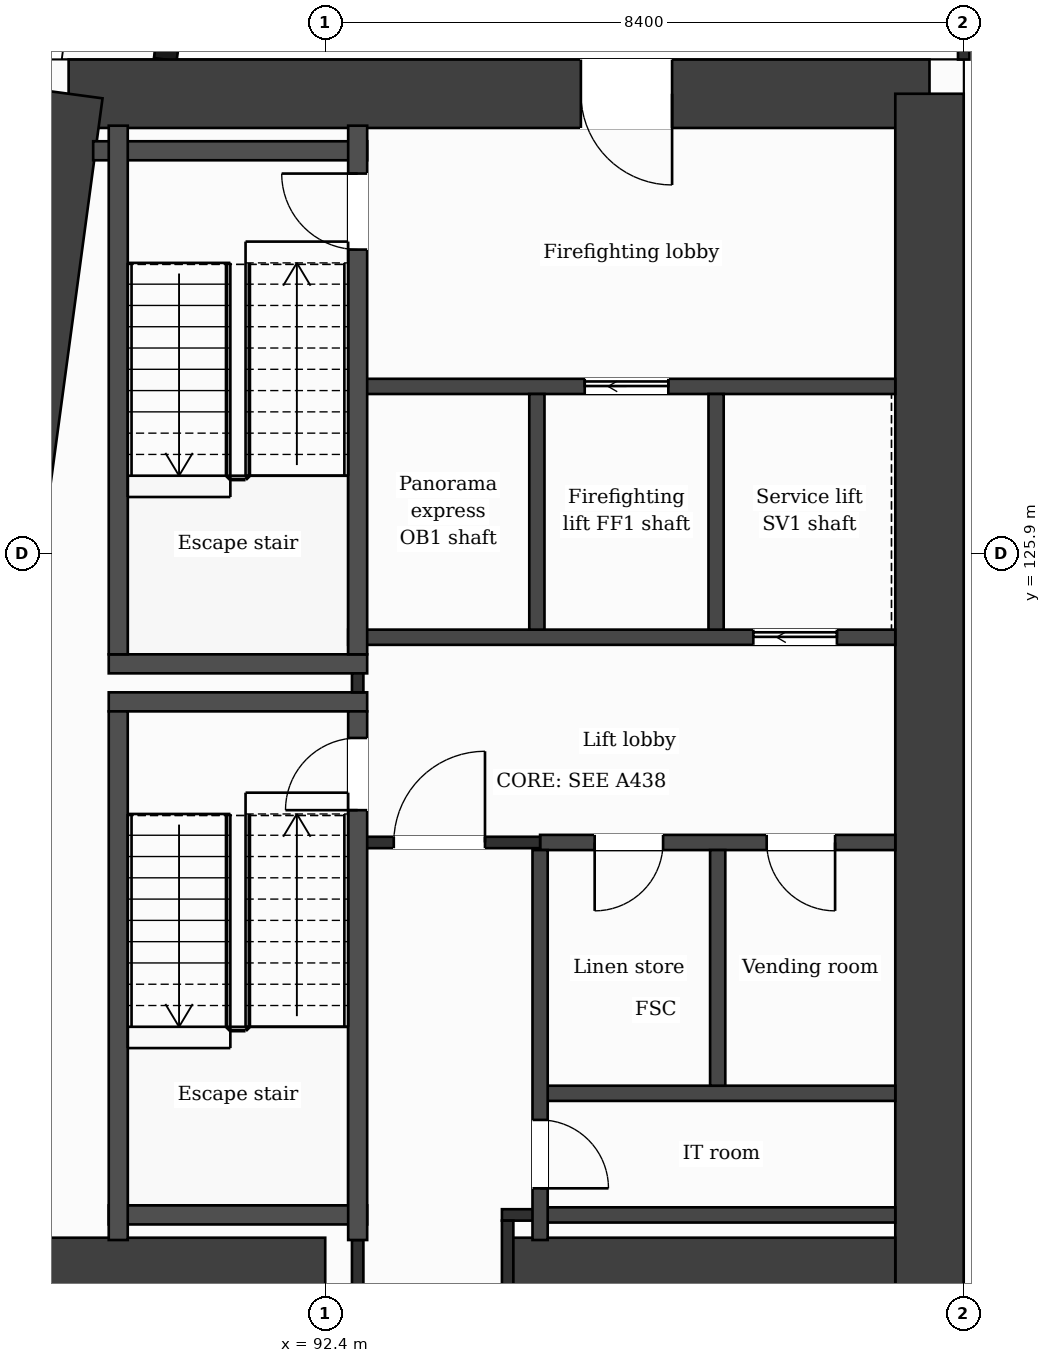
"""IFC4 building model, lengths in metres.
Left out: names, types, materials, properties, quantities, classifications, styles, units other than length and angle.
Written with IfcOpenShell. Run it as: python <this file> out.ifc"""

import sys

from ifc_helpers import new_model, si_unit, direction, frame, frame_2d, origin, place, context, subcontext, project, spatial, rectangle, extrude, element, fill, save


model = new_model("IFC4")
c1 = context("Model", 3, precision=1e-05, world=origin(), true_north=direction((0.0, 1.0)))
c2 = subcontext(c1, "Body", "Model", "MODEL_VIEW")
j1 = project(units=[si_unit("LENGTHUNIT", "METRE"), si_unit("PLANEANGLEUNIT", "RADIAN")], contexts=[c1])
p1 = place(None, origin())
s1 = spatial("IfcSite", under=j1, at=p1, CompositionType="ELEMENT")
p2 = place(p1, origin())
s2 = spatial("IfcBuilding", under=s1, at=p2, CompositionType="ELEMENT")
p3 = place(p2, frame((0.0, 0.0, 158.9)))
s3 = spatial("IfcBuildingStorey", under=s2, at=p3, CompositionType="ELEMENT", Elevation=158.9)
p4 = place(p3, frame((89.024, 131.95, 0.0), z_axis=(0.0, 0.0, 1.0), x_axis=(1.0, 0.0, 0.0)))
e1 = element("IfcWall", 1, at=p4, inside=s3, PredefinedType="SHEAR", context=c2, shape_type="SweptSolid", body=[
    extrude(rectangle(XDim=11.326, YDim=0.9, at=frame_2d((5.663, 0.0))), origin(), (0.0, 0.0, 1.0), 3.7),
])
p5 = place(p4, frame((6.739, 0.0, 0.0)))
e2 = element("IfcOpeningElement", 2, at=p5, cuts=e1, PredefinedType="OPENING", context=c2, shape_type="SweptSolid", body=[
    extrude(rectangle(XDim=1.2, YDim=2.1, at=frame_2d((0.6, 1.05))), frame((0.0, 0.46, 0.0), z_axis=(0.0, -1.0, 0.0), x_axis=(1.0, 0.0, 0.0)), (0.0, 0.0, 1.0), 0.92),
])
p6 = place(p3, frame((100.35, 131.95, 0.0), z_axis=(0.0, 0.0, 1.0), x_axis=(0.0, -1.0, 0.0)))
e3 = element("IfcWall", 3, at=p6, inside=s3, PredefinedType="SHEAR", context=c2, shape_type="SweptSolid", body=[
    extrude(rectangle(XDim=21.1, YDim=0.9, at=frame_2d((10.55, 0.0))), origin(), (0.0, 0.0, 1.0), 3.7),
])
p7 = place(p3, frame((86.184, 110.85, 0.0), z_axis=(0.0, 0.0, 1.0), x_axis=(0.133410495943, 0.991060865725, 0.0)))
e4 = element("IfcWall", 4, at=p7, inside=s3, PredefinedType="SHEAR", context=c2, shape_type="SweptSolid", body=[
    extrude(rectangle(XDim=21.29, YDim=0.9, at=frame_2d((10.645, 0.0))), origin(), (0.0, 0.0, 1.0), 3.7),
])
p8 = place(p3, frame((87.323, 116.45, 0.0), z_axis=(0.0, 0.0, 1.0), x_axis=(1.0, 0.0, 0.0)))
e5 = element("IfcWall", 5, at=p8, inside=s3, PredefinedType="SHEAR", context=c2, shape_type="SweptSolid", body=[
    extrude(rectangle(XDim=5.077, YDim=0.9, at=frame_2d((2.539, 0.0))), origin(), (0.0, 0.0, 1.0), 3.7),
])
p9 = place(p3, frame((94.8, 116.45, 0.0), z_axis=(0.0, 0.0, 1.0), x_axis=(1.0, 0.0, 0.0)))
e6 = element("IfcWall", 6, at=p9, inside=s3, PredefinedType="SHEAR", context=c2, shape_type="SweptSolid", body=[
    extrude(rectangle(XDim=5.1, YDim=0.9, at=frame_2d((2.55, 0.0))), origin(), (0.0, 0.0, 1.0), 3.7),
])
p10 = place(p3, frame((91.177, 138.95, 0.0), z_axis=(0.0, 0.0, 1.0), x_axis=(-0.133426664613, -0.991058689065, 0.0)))
e7 = element("IfcWall", 7, at=p10, inside=s3, PredefinedType="SOLIDWALL", context=c2, shape_type="SweptSolid", body=[
    extrude(rectangle(XDim=6.609, YDim=0.3, at=frame_2d((3.305, 0.0))), origin(), (0.0, 0.0, 1.0), 3.38),
])
p11 = place(p10, frame((1.039, 0.0, 0.9)))
e8 = element("IfcOpeningElement", 8, at=p11, cuts=e7, PredefinedType="OPENING", context=c2, shape_type="SweptSolid", body=[
    extrude(rectangle(XDim=1.2, YDim=2.1, at=frame_2d((0.6, 1.05))), frame((0.0, 0.16, 0.0), z_axis=(0.0, -1.0, 0.0), x_axis=(1.0, 0.0, 0.0)), (0.0, 0.0, 1.0), 0.32),
])
p12 = place(p10, frame((4.294, 0.0, 0.0)))
e9 = element("IfcOpeningElement", 9, at=p12, cuts=e7, PredefinedType="OPENING", context=c2, shape_type="SweptSolid", body=[
    extrude(rectangle(XDim=1.2, YDim=2.4, at=frame_2d((0.6, 1.2))), frame((0.0, 0.16, 0.0), z_axis=(0.0, -1.0, 0.0), x_axis=(1.0, 0.0, 0.0)), (0.0, 0.0, 1.0), 0.32),
])
p13 = place(p3, frame((95.227, 117.2, 0.0), z_axis=(0.0, 0.0, 1.0), x_axis=(1.0, 0.0, 0.0)))
e10 = element("IfcWall", 10, at=p13, inside=s3, PredefinedType="PARTITIONING", context=c2, shape_type="SweptSolid", body=[
    extrude(rectangle(XDim=4.673, YDim=0.2, at=frame_2d((2.336, 0.0))), origin(), (0.0, 0.0, 1.0), 3.38),
])
p14 = place(p3, frame((94.725, 117.2, 0.0), z_axis=(0.0, 0.0, 1.0), x_axis=(1.0, 0.0, 0.0)))
e11 = element("IfcWall", 11, at=p14, inside=s3, PredefinedType="PARTITIONING", context=c2, shape_type="SweptSolid", body=[
    extrude(rectangle(XDim=0.502, YDim=0.15, at=frame_2d((0.251, 0.0))), origin(), (0.0, 0.0, 1.0), 3.38),
])
p15 = place(p3, frame((89.552, 117.2, 0.0), z_axis=(0.0, 0.0, 1.0), x_axis=(1.0, 0.0, 0.0)))
e12 = element("IfcWall", 12, at=p15, inside=s3, PredefinedType="PARTITIONING", context=c2, shape_type="SweptSolid", body=[
    extrude(rectangle(XDim=3.4, YDim=0.25, at=frame_2d((1.7, 0.0))), origin(), (0.0, 0.0, 1.0), 3.38),
])
p16 = place(p3, frame((95.227, 118.8, 0.0), z_axis=(0.0, 0.0, 1.0), x_axis=(1.0, 0.0, 0.0)))
e13 = element("IfcWall", 13, at=p16, inside=s3, PredefinedType="PARTITIONING", context=c2, shape_type="SweptSolid", body=[
    extrude(rectangle(XDim=4.673, YDim=0.2, at=frame_2d((2.336, 0.0))), origin(), (0.0, 0.0, 1.0), 3.38),
])
p17 = place(p3, frame((95.227, 122.1, 0.0), z_axis=(0.0, 0.0, 1.0), x_axis=(1.0, 0.0, 0.0)))
e14 = element("IfcWall", 14, at=p17, inside=s3, PredefinedType="PARTITIONING", context=c2, shape_type="SweptSolid", body=[
    extrude(rectangle(XDim=4.673, YDim=0.2, at=frame_2d((2.336, 0.0))), origin(), (0.0, 0.0, 1.0), 3.38),
])
p18 = place(p17, frame((0.718, 0.0, 0.0)))
e15 = element("IfcOpeningElement", 15, at=p18, cuts=e14, PredefinedType="OPENING", context=c2, shape_type="SweptSolid", body=[
    extrude(rectangle(XDim=0.9, YDim=2.1, at=frame_2d((0.45, 1.05))), frame((0.0, 0.11, 0.0), z_axis=(0.0, -1.0, 0.0), x_axis=(1.0, 0.0, 0.0)), (0.0, 0.0, 1.0), 0.22),
])
p19 = place(p17, frame((2.981, 0.0, 0.0)))
e16 = element("IfcOpeningElement", 16, at=p19, cuts=e14, PredefinedType="OPENING", context=c2, shape_type="SweptSolid", body=[
    extrude(rectangle(XDim=0.9, YDim=2.1, at=frame_2d((0.45, 1.05))), frame((0.0, 0.11, 0.0), z_axis=(0.0, -1.0, 0.0), x_axis=(1.0, 0.0, 0.0)), (0.0, 0.0, 1.0), 0.22),
])
p20 = place(p3, frame((92.827, 122.1, 0.0), z_axis=(0.0, 0.0, 1.0), x_axis=(1.0, 0.0, 0.0)))
e17 = element("IfcWall", 17, at=p20, inside=s3, PredefinedType="PARTITIONING", context=c2, shape_type="SweptSolid", body=[
    extrude(rectangle(XDim=2.4, YDim=0.15, at=frame_2d((1.2, 0.0))), origin(), (0.0, 0.0, 1.0), 3.38),
])
p21 = place(p20, frame((0.475, 0.0, 0.0)))
e18 = element("IfcOpeningElement", 18, at=p21, cuts=e17, PredefinedType="OPENING", context=c2, shape_type="SweptSolid", body=[
    extrude(rectangle(XDim=1.2, YDim=2.1, at=frame_2d((0.6, 1.05))), frame((0.0, 0.085, 0.0), z_axis=(0.0, -1.0, 0.0), x_axis=(1.0, 0.0, 0.0)), (0.0, 0.0, 1.0), 0.17),
])
for number, where, z_axis, x_axis in (
    (19, (89.552, 123.95, 0.0), (0.0, 0.0, 1.0), (1.0, 0.0, 0.0)),
    (20, (89.552, 124.45, 0.0), (0.0, 0.0, 1.0), (1.0, 0.0, 0.0)),
):
    element("IfcWall", number, at=place(p3, frame(where, z_axis=z_axis, x_axis=x_axis)), inside=s3, PredefinedType="PARTITIONING", context=c2, shape_type="SweptSolid", body=[
        extrude(rectangle(XDim=3.4, YDim=0.25, at=frame_2d((1.7, 0.0))), origin(), (0.0, 0.0, 1.0), 3.38),
    ])
p22 = place(p3, frame((92.702, 124.8, 0.0), z_axis=(0.0, 0.0, 1.0), x_axis=(1.0, 0.0, 0.0)))
e21 = element("IfcWall", 21, at=p22, inside=s3, PredefinedType="PARTITIONING", context=c2, shape_type="SweptSolid", body=[
    extrude(rectangle(XDim=7.198, YDim=0.2, at=frame_2d((3.599, 0.0))), origin(), (0.0, 0.0, 1.0), 3.38),
])
p23 = place(p22, frame((5.33, 0.0, 0.0)))
e22 = element("IfcOpeningElement", 22, at=p23, cuts=e21, PredefinedType="OPENING", context=c2, shape_type="SweptSolid", body=[
    extrude(rectangle(XDim=1.1, YDim=2.1, at=frame_2d((0.55, 1.05))), frame((0.0, 0.11, 0.0), z_axis=(0.0, -1.0, 0.0), x_axis=(1.0, 0.0, 0.0)), (0.0, 0.0, 1.0), 0.22),
])
p24 = place(p3, frame((92.827, 128.1, 0.0), z_axis=(0.0, 0.0, 1.0), x_axis=(1.0, 0.0, 0.0)))
e23 = element("IfcWall", 23, at=p24, inside=s3, PredefinedType="PARTITIONING", context=c2, shape_type="SweptSolid", body=[
    extrude(rectangle(XDim=7.073, YDim=0.2, at=frame_2d((3.537, 0.0))), origin(), (0.0, 0.0, 1.0), 3.38),
])
p25 = place(p24, frame((2.987, 0.0, 0.0)))
e24 = element("IfcOpeningElement", 24, at=p25, cuts=e23, PredefinedType="OPENING", context=c2, shape_type="SweptSolid", body=[
    extrude(rectangle(XDim=1.1, YDim=2.1, at=frame_2d((0.55, 1.05))), frame((0.0, 0.11, 0.0), z_axis=(0.0, -1.0, 0.0), x_axis=(1.0, 0.0, 0.0)), (0.0, 0.0, 1.0), 0.22),
])
p26 = place(p3, frame((89.347, 131.2, 0.0), z_axis=(0.0, 0.0, 1.0), x_axis=(1.0, 0.0, 0.0)))
e25 = element("IfcWall", 25, at=p26, inside=s3, PredefinedType="PARTITIONING", context=c2, shape_type="SweptSolid", body=[
    extrude(rectangle(XDim=3.604, YDim=0.25, at=frame_2d((1.802, 0.0))), origin(), (0.0, 0.0, 1.0), 3.38),
])
p27 = place(p3, frame((89.677, 116.87, 0.0), z_axis=(0.0, 0.0, 1.0), x_axis=(0.0, 1.0, 0.0)))
e26 = element("IfcWall", 26, at=p27, inside=s3, PredefinedType="PARTITIONING", context=c2, shape_type="SweptSolid", body=[
    extrude(rectangle(XDim=6.955, YDim=0.25, at=frame_2d((3.478, 0.0))), origin(), (0.0, 0.0, 1.0), 3.38),
])
p28 = place(p3, frame((89.677, 124.575, 0.0), z_axis=(0.0, 0.0, 1.0), x_axis=(0.0, 1.0, 0.0)))
e27 = element("IfcWall", 27, at=p28, inside=s3, PredefinedType="PARTITIONING", context=c2, shape_type="SweptSolid", body=[
    extrude(rectangle(XDim=6.955, YDim=0.25, at=frame_2d((3.478, 0.0))), origin(), (0.0, 0.0, 1.0), 3.38),
])
p29 = place(p3, frame((92.827, 116.0, 0.0), z_axis=(0.0, 0.0, 1.0), x_axis=(0.0, 1.0, 0.0)))
e28 = element("IfcWall", 28, at=p29, inside=s3, PredefinedType="PARTITIONING", context=c2, shape_type="SweptSolid", body=[
    extrude(rectangle(XDim=0.87, YDim=0.15, at=frame_2d((0.435, 0.0))), origin(), (0.0, 0.0, 1.0), 3.38),
])
p30 = place(p3, frame((92.827, 124.075, 0.0), z_axis=(0.0, 0.0, 1.0), x_axis=(0.0, 1.0, 0.0)))
e29 = element("IfcWall", 29, at=p30, inside=s3, PredefinedType="PARTITIONING", context=c2, shape_type="SweptSolid", body=[
    extrude(rectangle(XDim=0.25, YDim=0.15, at=frame_2d((0.125, 0.0))), origin(), (0.0, 0.0, 1.0), 3.38),
])
p31 = place(p3, frame((92.827, 116.87, 0.0), z_axis=(0.0, 0.0, 1.0), x_axis=(0.0, 1.0, 0.0)))
e30 = element("IfcWall", 30, at=p31, inside=s3, PredefinedType="PARTITIONING", context=c2, shape_type="SweptSolid", body=[
    extrude(rectangle(XDim=6.955, YDim=0.25, at=frame_2d((3.478, 0.0))), origin(), (0.0, 0.0, 1.0), 3.38),
])
p32 = place(p31, frame((5.655, 0.0, 0.0)))
e31 = element("IfcOpeningElement", 31, at=p32, cuts=e30, PredefinedType="OPENING", context=c2, shape_type="SweptSolid", body=[
    extrude(rectangle(XDim=0.95, YDim=2.1, at=frame_2d((0.475, 1.05))), frame((0.0, 0.135, 0.0), z_axis=(0.0, -1.0, 0.0), x_axis=(1.0, 0.0, 0.0)), (0.0, 0.0, 1.0), 0.27),
])
p33 = place(p3, frame((92.827, 124.575, 0.0), z_axis=(0.0, 0.0, 1.0), x_axis=(0.0, 1.0, 0.0)))
e32 = element("IfcWall", 32, at=p33, inside=s3, PredefinedType="PARTITIONING", context=c2, shape_type="SweptSolid", body=[
    extrude(rectangle(XDim=6.955, YDim=0.25, at=frame_2d((3.478, 0.0))), origin(), (0.0, 0.0, 1.0), 3.38),
])
p34 = place(p33, frame((5.325, 0.0, 0.0)))
e33 = element("IfcOpeningElement", 33, at=p34, cuts=e32, PredefinedType="OPENING", context=c2, shape_type="SweptSolid", body=[
    extrude(rectangle(XDim=1.0, YDim=2.1, at=frame_2d((0.5, 1.05))), frame((0.0, 0.135, 0.0), z_axis=(0.0, -1.0, 0.0), x_axis=(1.0, 0.0, 0.0)), (0.0, 0.0, 1.0), 0.27),
])
p35 = place(p3, frame((94.8, 116.0, 0.0), z_axis=(0.0, 0.0, 1.0), x_axis=(0.0, 1.0, 0.0)))
e34 = element("IfcWall", 34, at=p35, inside=s3, PredefinedType="PARTITIONING", context=c2, shape_type="SweptSolid", body=[
    extrude(rectangle(XDim=1.125, YDim=0.15, at=frame_2d((0.562, 0.0))), origin(), (0.0, 0.0, 1.0), 3.38),
])
p36 = place(p3, frame((95.185, 124.9, 0.0), z_axis=(0.0, 0.0, 1.0), x_axis=(0.0, 1.0, 0.0)))
e35 = element("IfcWall", 35, at=p36, inside=s3, PredefinedType="PARTITIONING", context=c2, shape_type="SweptSolid", body=[
    extrude(rectangle(XDim=3.1, YDim=0.2, at=frame_2d((1.55, 0.0))), origin(), (0.0, 0.0, 1.0), 3.38),
])
p37 = place(p3, frame((95.227, 116.87, 0.0), z_axis=(0.0, 0.0, 1.0), x_axis=(0.0, 1.0, 0.0)))
e36 = element("IfcWall", 36, at=p37, inside=s3, PredefinedType="PARTITIONING", context=c2, shape_type="SweptSolid", body=[
    extrude(rectangle(XDim=5.13, YDim=0.2, at=frame_2d((2.565, 0.0))), origin(), (0.0, 0.0, 1.0), 3.38),
])
p38 = place(p37, frame((0.68, 0.0, 0.0)))
e37 = element("IfcOpeningElement", 37, at=p38, cuts=e36, PredefinedType="OPENING", context=c2, shape_type="SweptSolid", body=[
    extrude(rectangle(XDim=0.9, YDim=2.1, at=frame_2d((0.45, 1.05))), frame((0.0, 0.11, 0.0), z_axis=(0.0, -1.0, 0.0), x_axis=(1.0, 0.0, 0.0)), (0.0, 0.0, 1.0), 0.22),
])
for number, where, z_axis, x_axis in (
    (38, (97.542, 124.9, 0.0), (0.0, 0.0, 1.0), (0.0, 1.0, 0.0)),
    (39, (97.563, 118.9, 0.0), (0.0, 0.0, 1.0), (0.0, 1.0, 0.0)),
):
    element("IfcWall", number, at=place(p3, frame(where, z_axis=z_axis, x_axis=x_axis)), inside=s3, PredefinedType="PARTITIONING", context=c2, shape_type="SweptSolid", body=[
        extrude(rectangle(XDim=3.1, YDim=0.2, at=frame_2d((1.55, 0.0))), origin(), (0.0, 0.0, 1.0), 3.38),
    ])
p39 = place(p3, frame((100.8, 132.4, 0.0), z_axis=(0.0, 0.0, 1.0), x_axis=(0.0, 1.0, 0.0)))
e40 = element("IfcWall", 40, at=p39, inside=s3, PredefinedType="PARTITIONING", context=c2, shape_type="SweptSolid", body=[
    extrude(rectangle(XDim=1.325, YDim=0.15, at=frame_2d((0.663, 0.0))), origin(), (0.0, 0.0, 1.0), 3.38),
])
p40 = place(p21, origin())
e41 = element("IfcDoor", 41, at=p40, inside=s3, OperationType="SINGLE_SWING_RIGHT", PredefinedType="DOOR", context=c2, shape_type="SweptSolid", body=[
    extrude(rectangle(XDim=1.2, YDim=2.1, at=frame_2d((0.6, 1.05))), frame((0.0, 0.025, 0.0), z_axis=(0.0, -1.0, 0.0), x_axis=(1.0, 0.0, 0.0)), (0.0, 0.0, 1.0), 0.05),
])
fill(e18, e41)
p41 = place(p25, origin())
e42 = element("IfcDoor", 42, at=p41, inside=s3, OperationType="SLIDING_TO_LEFT", PredefinedType="DOOR", context=c2, shape_type="SweptSolid", body=[
    extrude(rectangle(XDim=1.1, YDim=2.1, at=frame_2d((0.55, 1.05))), frame((0.0, 0.025, 0.0), z_axis=(0.0, -1.0, 0.0), x_axis=(1.0, 0.0, 0.0)), (0.0, 0.0, 1.0), 0.05),
])
fill(e24, e42)
p42 = place(p23, origin())
e43 = element("IfcDoor", 43, at=p42, inside=s3, OperationType="SLIDING_TO_LEFT", PredefinedType="DOOR", context=c2, shape_type="SweptSolid", body=[
    extrude(rectangle(XDim=1.1, YDim=2.1, at=frame_2d((0.55, 1.05))), frame((0.0, 0.025, 0.0), z_axis=(0.0, -1.0, 0.0), x_axis=(1.0, 0.0, 0.0)), (0.0, 0.0, 1.0), 0.05),
])
fill(e22, e43)
p43 = place(p18, origin())
e44 = element("IfcDoor", 44, at=p43, inside=s3, OperationType="SINGLE_SWING_LEFT", PredefinedType="DOOR", context=c2, shape_type="SweptSolid", body=[
    extrude(rectangle(XDim=0.9, YDim=2.1, at=frame_2d((0.45, 1.05))), frame((0.0, 0.025, 0.0), z_axis=(0.0, -1.0, 0.0), x_axis=(1.0, 0.0, 0.0)), (0.0, 0.0, 1.0), 0.05),
])
fill(e15, e44)
p44 = place(p19, origin())
e45 = element("IfcDoor", 45, at=p44, inside=s3, OperationType="SINGLE_SWING_RIGHT", PredefinedType="DOOR", context=c2, shape_type="SweptSolid", body=[
    extrude(rectangle(XDim=0.9, YDim=2.1, at=frame_2d((0.45, 1.05))), frame((0.0, 0.025, 0.0), z_axis=(0.0, -1.0, 0.0), x_axis=(1.0, 0.0, 0.0)), (0.0, 0.0, 1.0), 0.05),
])
fill(e16, e45)
p45 = place(p32, origin())
e46 = element("IfcDoor", 46, at=p45, inside=s3, OperationType="SINGLE_SWING_LEFT", PredefinedType="DOOR", context=c2, shape_type="SweptSolid", body=[
    extrude(rectangle(XDim=0.95, YDim=2.1, at=frame_2d((0.475, 1.05))), frame((0.0, 0.025, 0.0), z_axis=(0.0, -1.0, 0.0), x_axis=(1.0, 0.0, 0.0)), (0.0, 0.0, 1.0), 0.05),
])
fill(e31, e46)
p46 = place(p34, origin())
e47 = element("IfcDoor", 47, at=p46, inside=s3, OperationType="SINGLE_SWING_RIGHT", PredefinedType="DOOR", context=c2, shape_type="SweptSolid", body=[
    extrude(rectangle(XDim=1.0, YDim=2.1, at=frame_2d((0.5, 1.05))), frame((0.0, 0.025, 0.0), z_axis=(0.0, -1.0, 0.0), x_axis=(1.0, 0.0, 0.0)), (0.0, 0.0, 1.0), 0.05),
])
fill(e33, e47)
p47 = place(p38, origin())
e48 = element("IfcDoor", 48, at=p47, inside=s3, OperationType="SINGLE_SWING_LEFT", PredefinedType="DOOR", context=c2, shape_type="SweptSolid", body=[
    extrude(rectangle(XDim=0.9, YDim=2.1, at=frame_2d((0.45, 1.05))), frame((0.0, 0.025, 0.0), z_axis=(0.0, -1.0, 0.0), x_axis=(1.0, 0.0, 0.0)), (0.0, 0.0, 1.0), 0.05),
])
fill(e37, e48)
p48 = place(p5, origin())
e49 = element("IfcDoor", 49, at=p48, inside=s3, OperationType="SINGLE_SWING_RIGHT", PredefinedType="DOOR", context=c2, shape_type="SweptSolid", body=[
    extrude(rectangle(XDim=1.2, YDim=2.1, at=frame_2d((0.6, 1.05))), frame((0.0, 0.025, 0.0), z_axis=(0.0, -1.0, 0.0), x_axis=(1.0, 0.0, 0.0)), (0.0, 0.0, 1.0), 0.05),
])
fill(e2, e49)
save(model, sys.argv[1])
